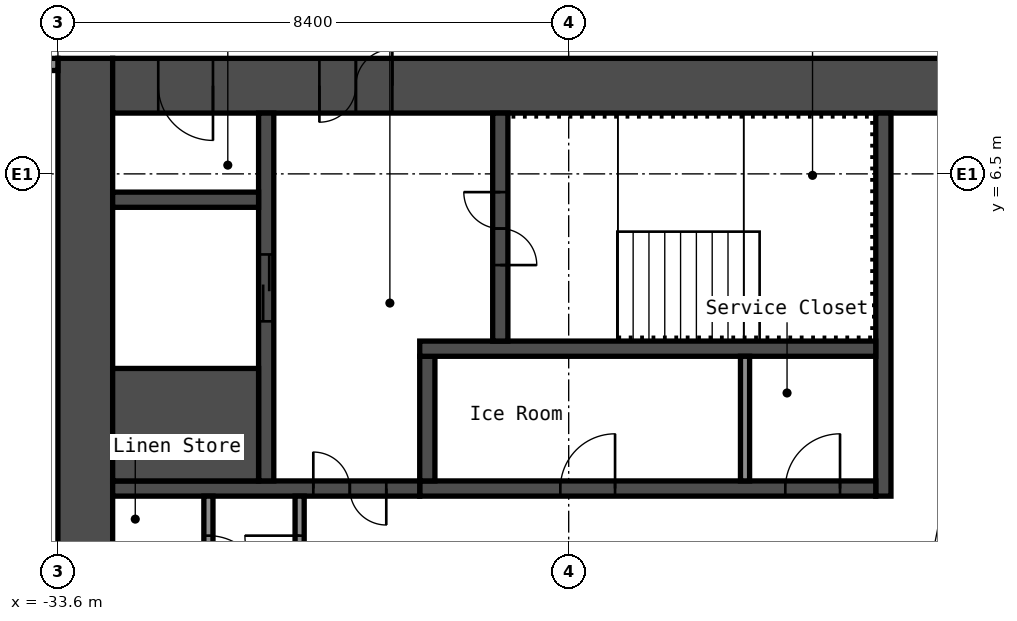
"""IFC4 building model, lengths in metres.
Left out: names, types, materials, properties, quantities, classifications, styles, units other than length and angle.
Written with IfcOpenShell. Run it as: python <this file> out.ifc"""

import sys

from ifc_helpers import new_model, si_unit, direction, frame, frame_2d, origin, place, context, subcontext, project, spatial, rectangle, extrude, element, fill, save


model = new_model("IFC4")
c1 = context("Model", 3, precision=1e-05, world=origin(), true_north=direction((0.0, 1.0)))
c2 = subcontext(c1, "Body", "Model", "MODEL_VIEW")
j1 = project(units=[si_unit("LENGTHUNIT", "METRE"), si_unit("PLANEANGLEUNIT", "RADIAN")], contexts=[c1])
p1 = place(None, origin())
s1 = spatial("IfcSite", under=j1, at=p1, CompositionType="ELEMENT")
p2 = place(p1, origin())
s2 = spatial("IfcBuilding", under=s1, at=p2, CompositionType="ELEMENT")
p3 = place(p2, frame((0.0, 0.0, 156.6)))
s3 = spatial("IfcBuildingStorey", under=s2, at=p3, CompositionType="ELEMENT", Elevation=156.6)
p4 = place(p3, frame((-33.15, -8.4, 0.0), z_axis=(0.0, 0.0, 1.0), x_axis=(0.0, 1.0, 0.0)))
e1 = element("IfcWall", 1, at=p4, inside=s3, PredefinedType="SHEAR", context=c2, shape_type="SweptSolid", body=[
    extrude(rectangle(XDim=16.8, YDim=0.9, at=frame_2d((8.4, 0.0))), origin(), (0.0, 0.0, 1.0), 2.75),
])
p5 = place(p3, frame((-32.7, 7.95, 0.0), z_axis=(0.0, 0.0, 1.0), x_axis=(1.0, 0.0, 0.0)))
e2 = element("IfcWall", 2, at=p5, inside=s3, PredefinedType="SHEAR", context=c2, shape_type="SweptSolid", body=[
    extrude(rectangle(XDim=15.0, YDim=0.9, at=frame_2d((7.5, 0.0))), origin(), (0.0, 0.0, 1.0), 2.75),
])
p6 = place(p5, frame((3.4, 0.0, 0.0)))
e3 = element("IfcOpeningElement", 3, at=p6, cuts=e2, PredefinedType="OPENING", context=c2, shape_type="SweptSolid", body=[
    extrude(rectangle(XDim=1.2, YDim=2.1, at=frame_2d((0.6, 1.05))), frame((0.0, 0.46, 0.0), z_axis=(0.0, -1.0, 0.0), x_axis=(1.0, 0.0, 0.0)), (0.0, 0.0, 1.0), 0.92),
])
p7 = place(p5, frame((0.75, 0.0, 0.0)))
e4 = element("IfcOpeningElement", 4, at=p7, cuts=e2, PredefinedType="OPENING", context=c2, shape_type="SweptSolid", body=[
    extrude(rectangle(XDim=0.9, YDim=2.1, at=frame_2d((0.45, 1.05))), frame((0.0, 0.46, 0.0), z_axis=(0.0, -1.0, 0.0), x_axis=(1.0, 0.0, 0.0)), (0.0, 0.0, 1.0), 0.92),
])
p8 = place(p3, frame((-20.025, 1.2, 0.0), z_axis=(0.0, 0.0, 1.0), x_axis=(0.0, 1.0, 0.0)))
e5 = element("IfcWall", 5, at=p8, inside=s3, PredefinedType="SHEAR", context=c2, shape_type="SweptSolid", body=[
    extrude(rectangle(XDim=6.3, YDim=0.25, at=frame_2d((3.15, 0.0))), origin(), (0.0, 0.0, 1.0), 2.75),
])
p9 = place(p3, frame((-27.65, 1.325, 0.0), z_axis=(0.0, 0.0, 1.0), x_axis=(1.0, 0.0, 0.0)))
e6 = element("IfcWall", 6, at=p9, inside=s3, PredefinedType="SHEAR", context=c2, shape_type="SweptSolid", body=[
    extrude(rectangle(XDim=7.5, YDim=0.25, at=frame_2d((3.75, 0.0))), origin(), (0.0, 0.0, 1.0), 2.75),
])
p10 = place(p9, frame((6.012, 0.0, 0.0)))
e7 = element("IfcOpeningElement", 7, at=p10, cuts=e6, PredefinedType="OPENING", context=c2, shape_type="SweptSolid", body=[
    extrude(rectangle(XDim=0.9, YDim=2.1, at=frame_2d((0.45, 1.05))), frame((0.0, 0.135, 0.0), z_axis=(0.0, -1.0, 0.0), x_axis=(1.0, 0.0, 0.0)), (0.0, 0.0, 1.0), 0.27),
])
p11 = place(p9, frame((2.312, 0.0, 0.0)))
e8 = element("IfcOpeningElement", 8, at=p11, cuts=e6, PredefinedType="OPENING", context=c2, shape_type="SweptSolid", body=[
    extrude(rectangle(XDim=0.9, YDim=2.1, at=frame_2d((0.45, 1.05))), frame((0.0, 0.135, 0.0), z_axis=(0.0, -1.0, 0.0), x_axis=(1.0, 0.0, 0.0)), (0.0, 0.0, 1.0), 0.27),
])
p12 = place(p3, frame((-27.525, 1.45, 0.0), z_axis=(0.0, 0.0, 1.0), x_axis=(0.0, 1.0, 0.0)))
e9 = element("IfcWall", 9, at=p12, inside=s3, PredefinedType="SHEAR", context=c2, shape_type="SweptSolid", body=[
    extrude(rectangle(XDim=2.05, YDim=0.25, at=frame_2d((1.025, 0.0))), origin(), (0.0, 0.0, 1.0), 2.75),
])
p13 = place(p3, frame((-27.65, 3.625, 0.0), z_axis=(0.0, 0.0, 1.0), x_axis=(1.0, 0.0, 0.0)))
e10 = element("IfcWall", 10, at=p13, inside=s3, PredefinedType="SHEAR", context=c2, shape_type="SweptSolid", body=[
    extrude(rectangle(XDim=7.5, YDim=0.25, at=frame_2d((3.75, 0.0))), origin(), (0.0, 0.0, 1.0), 2.75),
])
p14 = place(p3, frame((-26.325, 3.75, 0.0), z_axis=(0.0, 0.0, 1.0), x_axis=(0.0, 1.0, 0.0)))
e11 = element("IfcWall", 11, at=p14, inside=s3, PredefinedType="SHEAR", context=c2, shape_type="SweptSolid", body=[
    extrude(rectangle(XDim=3.75, YDim=0.25, at=frame_2d((1.875, 0.0))), origin(), (0.0, 0.0, 1.0), 2.75),
])
p15 = place(p14, frame((1.25, 0.0, 0.0)))
e12 = element("IfcOpeningElement", 12, at=p15, cuts=e11, PredefinedType="OPENING", context=c2, shape_type="SweptSolid", body=[
    extrude(rectangle(XDim=1.2, YDim=2.1, at=frame_2d((0.6, 1.05))), frame((0.0, 0.135, 0.0), z_axis=(0.0, -1.0, 0.0), x_axis=(1.0, 0.0, 0.0)), (0.0, 0.0, 1.0), 0.27),
])
p16 = place(p3, frame((-32.7, 1.325, 0.0), z_axis=(0.0, 0.0, 1.0), x_axis=(1.0, 0.0, 0.0)))
e13 = element("IfcWall", 13, at=p16, inside=s3, PredefinedType="SHEAR", context=c2, shape_type="SweptSolid", body=[
    extrude(rectangle(XDim=5.05, YDim=0.25, at=frame_2d((2.525, 0.0))), origin(), (0.0, 0.0, 1.0), 2.75),
])
p17 = place(p16, frame((3.3, 0.0, 0.0)))
e14 = element("IfcOpeningElement", 14, at=p17, cuts=e13, PredefinedType="OPENING", context=c2, shape_type="SweptSolid", body=[
    extrude(rectangle(XDim=1.2, YDim=2.1, at=frame_2d((0.6, 1.05))), frame((0.0, 0.135, 0.0), z_axis=(0.0, -1.0, 0.0), x_axis=(1.0, 0.0, 0.0)), (0.0, 0.0, 1.0), 0.27),
])
p18 = place(p3, frame((-30.175, 1.45, 0.0), z_axis=(0.0, 0.0, 1.0), x_axis=(0.0, 1.0, 0.0)))
e15 = element("IfcWall", 15, at=p18, inside=s3, PredefinedType="SHEAR", context=c2, shape_type="SweptSolid", body=[
    extrude(rectangle(XDim=6.05, YDim=0.25, at=frame_2d((3.025, 0.0))), origin(), (0.0, 0.0, 1.0), 2.75),
])
p19 = place(p18, frame((2.625, 0.0, 0.0)))
e16 = element("IfcOpeningElement", 16, at=p19, cuts=e15, PredefinedType="OPENING", context=c2, shape_type="SweptSolid", body=[
    extrude(rectangle(XDim=1.1, YDim=2.1, at=frame_2d((0.55, 1.05))), frame((0.0, 0.135, 0.0), z_axis=(0.0, -1.0, 0.0), x_axis=(1.0, 0.0, 0.0)), (0.0, 0.0, 1.0), 0.27),
])
p20 = place(p3, frame((-32.7, 2.375, 0.0), z_axis=(0.0, 0.0, 1.0), x_axis=(1.0, 0.0, 0.0)))
e17 = element("IfcWall", 17, at=p20, inside=s3, PredefinedType="SHEAR", context=c2, shape_type="SweptSolid", body=[
    extrude(rectangle(XDim=2.4, YDim=1.85, at=frame_2d((1.2, 0.0))), origin(), (0.0, 0.0, 1.0), 2.75),
])
p21 = place(p3, frame((-32.7, 6.075, 0.0), z_axis=(0.0, 0.0, 1.0), x_axis=(1.0, 0.0, 0.0)))
e18 = element("IfcWall", 18, at=p21, inside=s3, PredefinedType="SHEAR", context=c2, shape_type="SweptSolid", body=[
    extrude(rectangle(XDim=2.4, YDim=0.25, at=frame_2d((1.2, 0.0))), origin(), (0.0, 0.0, 1.0), 2.75),
])
p22 = place(p3, frame((-29.625, -1.15, 0.0), z_axis=(0.0, 0.0, 1.0), x_axis=(0.0, 1.0, 0.0)))
e19 = element("IfcWall", 19, at=p22, inside=s3, PredefinedType="PARTITIONING", context=c2, shape_type="SweptSolid", body=[
    extrude(rectangle(XDim=2.35, YDim=0.15, at=frame_2d((1.175, 0.0))), origin(), (0.0, 0.0, 1.0), 2.75),
])
p23 = place(p22, frame((0.8, 0.0, 0.0)))
e20 = element("IfcOpeningElement", 20, at=p23, cuts=e19, PredefinedType="OPENING", context=c2, shape_type="SweptSolid", body=[
    extrude(rectangle(XDim=0.9, YDim=2.1, at=frame_2d((0.45, 1.05))), frame((0.0, 0.085, 0.0), z_axis=(0.0, -1.0, 0.0), x_axis=(1.0, 0.0, 0.0)), (0.0, 0.0, 1.0), 0.17),
])
p24 = place(p3, frame((-31.125, -1.0, 0.0), z_axis=(0.0, 0.0, 1.0), x_axis=(0.0, 1.0, 0.0)))
e21 = element("IfcWall", 21, at=p24, inside=s3, PredefinedType="PARTITIONING", context=c2, shape_type="SweptSolid", body=[
    extrude(rectangle(XDim=2.2, YDim=0.15, at=frame_2d((1.1, 0.0))), origin(), (0.0, 0.0, 1.0), 2.75),
])
p25 = place(p24, frame((0.65, 0.0, 0.0)))
e22 = element("IfcOpeningElement", 22, at=p25, cuts=e21, PredefinedType="OPENING", context=c2, shape_type="SweptSolid", body=[
    extrude(rectangle(XDim=0.9, YDim=2.1, at=frame_2d((0.45, 1.05))), frame((0.0, 0.085, 0.0), z_axis=(0.0, -1.0, 0.0), x_axis=(1.0, 0.0, 0.0)), (0.0, 0.0, 1.0), 0.17),
])
p26 = place(p3, frame((-22.3, 1.45, 0.0), z_axis=(0.0, 0.0, 1.0), x_axis=(0.0, 1.0, 0.0)))
e23 = element("IfcWall", 23, at=p26, inside=s3, PredefinedType="PARTITIONING", context=c2, shape_type="SweptSolid", body=[
    extrude(rectangle(XDim=2.05, YDim=0.15, at=frame_2d((1.025, 0.0))), origin(), (0.0, 0.0, 1.0), 2.75),
])
p27 = place(p3, frame((-40.2, 8.3, 0.0), z_axis=(0.0, 0.0, 1.0), x_axis=(1.0, 0.0, 0.0)))
e24 = element("IfcWall", 24, at=p27, inside=s3, PredefinedType="PARTITIONING", context=c2, shape_type="SweptSolid", body=[
    extrude(rectangle(XDim=6.6, YDim=0.2, at=frame_2d((3.3, 0.0))), origin(), (0.0, 0.0, 1.0), 2.75),
])
p28 = place(p27, frame((0.87, 0.0, 0.0)))
e25 = element("IfcOpeningElement", 25, at=p28, cuts=e24, PredefinedType="OPENING", context=c2, shape_type="SweptSolid", body=[
    extrude(rectangle(XDim=0.9, YDim=2.1, at=frame_2d((0.45, 1.05))), frame((0.0, 0.11, 0.0), z_axis=(0.0, -1.0, 0.0), x_axis=(1.0, 0.0, 0.0)), (0.0, 0.0, 1.0), 0.22),
])
p29 = place(p27, frame((4.17, 0.0, 0.0)))
e26 = element("IfcOpeningElement", 26, at=p29, cuts=e24, PredefinedType="OPENING", context=c2, shape_type="SweptSolid", body=[
    extrude(rectangle(XDim=0.9, YDim=2.1, at=frame_2d((0.45, 1.05))), frame((0.0, 0.11, 0.0), z_axis=(0.0, -1.0, 0.0), x_axis=(1.0, 0.0, 0.0)), (0.0, 0.0, 1.0), 0.22),
])
p30 = place(p6, origin())
e27 = element("IfcDoor", 27, at=p30, inside=s3, OperationType="DOUBLE_DOOR_SINGLE_SWING", PredefinedType="DOOR", context=c2, shape_type="SweptSolid", body=[
    extrude(rectangle(XDim=1.2, YDim=2.1, at=frame_2d((0.6, 1.05))), frame((0.0, 0.025, 0.0), z_axis=(0.0, -1.0, 0.0), x_axis=(1.0, 0.0, 0.0)), (0.0, 0.0, 1.0), 0.05),
])
fill(e3, e27)
p31 = place(p7, origin())
e28 = element("IfcDoor", 28, at=p31, inside=s3, OperationType="SINGLE_SWING_RIGHT", PredefinedType="DOOR", context=c2, shape_type="SweptSolid", body=[
    extrude(rectangle(XDim=0.9, YDim=2.1, at=frame_2d((0.45, 1.05))), frame((0.0, 0.025, 0.0), z_axis=(0.0, -1.0, 0.0), x_axis=(1.0, 0.0, 0.0)), (0.0, 0.0, 1.0), 0.05),
])
fill(e4, e28)
p32 = place(p15, origin())
e29 = element("IfcDoor", 29, at=p32, inside=s3, OperationType="DOUBLE_DOOR_SINGLE_SWING", PredefinedType="DOOR", context=c2, shape_type="SweptSolid", body=[
    extrude(rectangle(XDim=1.2, YDim=2.1, at=frame_2d((0.6, 1.05))), frame((0.0, 0.025, 0.0), z_axis=(0.0, -1.0, 0.0), x_axis=(1.0, 0.0, 0.0)), (0.0, 0.0, 1.0), 0.05),
])
fill(e12, e29)
p33 = place(p17, origin())
e30 = element("IfcDoor", 30, at=p33, inside=s3, OperationType="DOUBLE_DOOR_SINGLE_SWING", PredefinedType="DOOR", context=c2, shape_type="SweptSolid", body=[
    extrude(rectangle(XDim=1.2, YDim=2.1, at=frame_2d((0.6, 1.05))), frame((0.0, 0.025, 0.0), z_axis=(0.0, -1.0, 0.0), x_axis=(1.0, 0.0, 0.0)), (0.0, 0.0, 1.0), 0.05),
])
fill(e14, e30)
p34 = place(p23, origin())
e31 = element("IfcDoor", 31, at=p34, inside=s3, OperationType="SINGLE_SWING_LEFT", PredefinedType="DOOR", context=c2, shape_type="SweptSolid", body=[
    extrude(rectangle(XDim=0.9, YDim=2.1, at=frame_2d((0.45, 1.05))), frame((0.0, 0.025, 0.0), z_axis=(0.0, -1.0, 0.0), x_axis=(1.0, 0.0, 0.0)), (0.0, 0.0, 1.0), 0.05),
])
fill(e20, e31)
p35 = place(p25, origin())
e32 = element("IfcDoor", 32, at=p35, inside=s3, OperationType="SINGLE_SWING_LEFT", PredefinedType="DOOR", context=c2, shape_type="SweptSolid", body=[
    extrude(rectangle(XDim=0.9, YDim=2.1, at=frame_2d((0.45, 1.05))), frame((0.0, 0.025, 0.0), z_axis=(0.0, -1.0, 0.0), x_axis=(1.0, 0.0, 0.0)), (0.0, 0.0, 1.0), 0.05),
])
fill(e22, e32)
p36 = place(p10, origin())
e33 = element("IfcDoor", 33, at=p36, inside=s3, OperationType="SINGLE_SWING_LEFT", PredefinedType="DOOR", context=c2, shape_type="SweptSolid", body=[
    extrude(rectangle(XDim=0.9, YDim=2.1, at=frame_2d((0.45, 1.05))), frame((0.0, 0.025, 0.0), z_axis=(0.0, -1.0, 0.0), x_axis=(1.0, 0.0, 0.0)), (0.0, 0.0, 1.0), 0.05),
])
fill(e7, e33)
p37 = place(p11, origin())
e34 = element("IfcDoor", 34, at=p37, inside=s3, OperationType="SINGLE_SWING_LEFT", PredefinedType="DOOR", context=c2, shape_type="SweptSolid", body=[
    extrude(rectangle(XDim=0.9, YDim=2.1, at=frame_2d((0.45, 1.05))), frame((0.0, 0.025, 0.0), z_axis=(0.0, -1.0, 0.0), x_axis=(1.0, 0.0, 0.0)), (0.0, 0.0, 1.0), 0.05),
])
fill(e8, e34)
p38 = place(p19, origin())
e35 = element("IfcDoor", 35, at=p38, inside=s3, OperationType="DOUBLE_DOOR_SLIDING", PredefinedType="DOOR", context=c2, shape_type="SweptSolid", body=[
    extrude(rectangle(XDim=1.1, YDim=2.1, at=frame_2d((0.55, 1.05))), frame((0.0, 0.025, 0.0), z_axis=(0.0, -1.0, 0.0), x_axis=(1.0, 0.0, 0.0)), (0.0, 0.0, 1.0), 0.05),
])
fill(e16, e35)
save(model, sys.argv[1])
